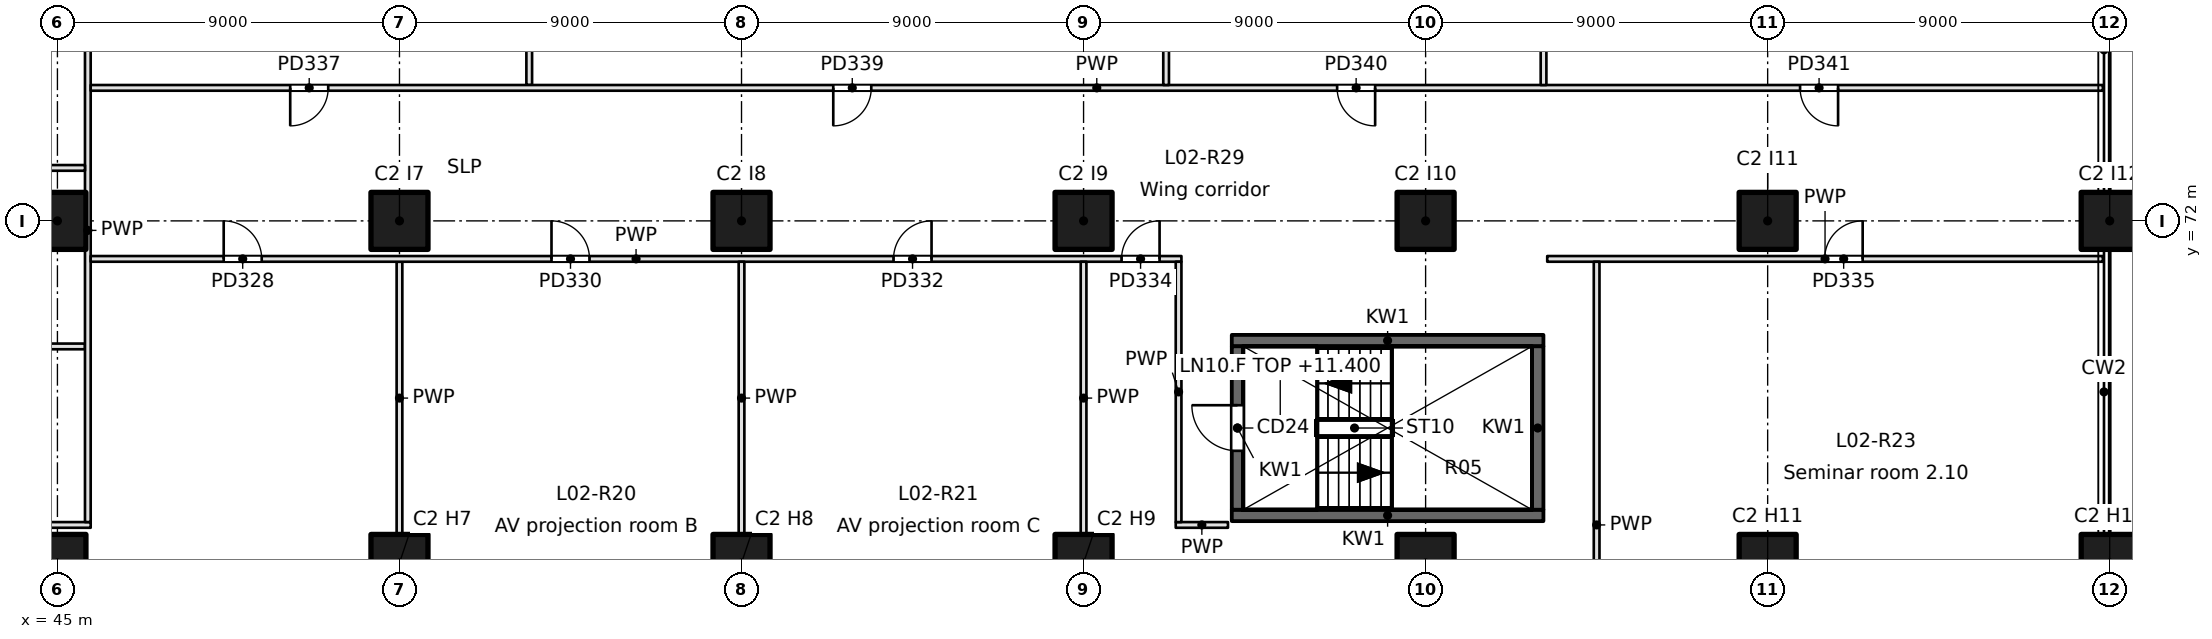
"""IFC4 building model, lengths in metres.
Left out: names, types, materials, properties, quantities, classifications, styles, units other than length and angle.
Written with IfcOpenShell. Run it as: python <this file> out.ifc"""

import sys

from ifc_helpers import new_model, si_unit, direction, frame, frame_2d, origin, origin_2d, place, context, subcontext, project, spatial, rectangle, extrude, element, fill, save


model = new_model("IFC4")
c1 = context("Model", 3, precision=1e-05, world=origin(), true_north=direction((0.0, 1.0)))
c2 = subcontext(c1, "Body", "Model", "MODEL_VIEW")
j1 = project(units=[si_unit("LENGTHUNIT", "METRE"), si_unit("PLANEANGLEUNIT", "RADIAN")], contexts=[c1])
p1 = place(None, origin())
s1 = spatial("IfcSite", under=j1, at=p1, CompositionType="ELEMENT")
p2 = place(p1, origin())
s2 = spatial("IfcBuilding", under=s1, at=p2, CompositionType="ELEMENT")
p3 = place(p2, frame((0.0, 0.0, 11.4)))
s3 = spatial("IfcBuildingStorey", under=s2, at=p3, CompositionType="ELEMENT", Elevation=11.4)
for number, where, z_axis, x_axis in (
    (1, (99.0, 63.0, 0.0), (0.0, 0.0, 1.0), (1.0, 0.0, 0.0)),
    (2, (99.0, 72.0, 0.0), (0.0, 0.0, 1.0), (1.0, 0.0, 0.0)),
    (3, (45.0, 63.0, 0.0), (0.0, 0.0, 1.0), (1.0, 0.0, 0.0)),
    (4, (45.0, 72.0, 0.0), (0.0, 0.0, 1.0), (1.0, 0.0, 0.0)),
    (5, (54.0, 63.0, 0.0), (0.0, 0.0, 1.0), (1.0, 0.0, 0.0)),
    (6, (54.0, 72.0, 0.0), (0.0, 0.0, 1.0), (1.0, 0.0, 0.0)),
    (7, (63.0, 63.0, 0.0), (0.0, 0.0, 1.0), (1.0, 0.0, 0.0)),
    (8, (63.0, 72.0, 0.0), (0.0, 0.0, 1.0), (1.0, 0.0, 0.0)),
    (9, (72.0, 63.0, 0.0), (0.0, 0.0, 1.0), (1.0, 0.0, 0.0)),
    (10, (72.0, 72.0, 0.0), (0.0, 0.0, 1.0), (1.0, 0.0, 0.0)),
    (11, (81.0, 63.0, 0.0), (0.0, 0.0, 1.0), (1.0, 0.0, 0.0)),
    (12, (81.0, 72.0, 0.0), (0.0, 0.0, 1.0), (1.0, 0.0, 0.0)),
    (13, (90.0, 63.0, 0.0), (0.0, 0.0, 1.0), (1.0, 0.0, 0.0)),
    (14, (90.0, 72.0, 0.0), (0.0, 0.0, 1.0), (1.0, 0.0, 0.0)),
):
    element("IfcColumn", number, at=place(p3, frame(where, z_axis=z_axis, x_axis=x_axis)), inside=s3, PredefinedType="COLUMN", context=c2, shape_type="SweptSolid", body=[
        extrude(rectangle(XDim=1.5, YDim=1.5, at=origin_2d()), origin(), (0.0, 0.0, 1.0), 5.4),
    ])
for number, where, z_axis, x_axis in (
    (15, (75.9, 64.25, -0.35), (0.0, 0.0, 1.0), (1.0, 0.0, 0.0)),
    (16, (75.9, 68.85, -0.35), (0.0, 0.0, 1.0), (1.0, 0.0, 0.0)),
):
    element("IfcWall", number, at=place(p3, frame(where, z_axis=z_axis, x_axis=x_axis)), inside=s3, PredefinedType="SOLIDWALL", context=c2, shape_type="SweptSolid", body=[
        extrude(rectangle(XDim=8.2, YDim=0.3, at=frame_2d((4.1, 0.0))), origin(), (0.0, 0.0, 1.0), 5.4),
    ])
p4 = place(p3, frame((76.05, 64.4, -0.35), z_axis=(0.0, 0.0, 1.0), x_axis=(0.0, 1.0, 0.0)))
e17 = element("IfcWall", 17, at=p4, inside=s3, PredefinedType="SOLIDWALL", context=c2, shape_type="SweptSolid", body=[
    extrude(rectangle(XDim=4.3, YDim=0.3, at=frame_2d((2.15, 0.0))), origin(), (0.0, 0.0, 1.0), 5.4),
])
p5 = place(p4, frame((1.55, 0.0, 0.35)))
e18 = element("IfcOpeningElement", 18, at=p5, cuts=e17, PredefinedType="OPENING", context=c2, shape_type="SweptSolid", body=[
    extrude(rectangle(XDim=1.2, YDim=2.1, at=frame_2d((0.6, 1.05))), frame((0.0, 0.15, 0.0), z_axis=(0.0, -1.0, 0.0), x_axis=(1.0, 0.0, 0.0)), (0.0, 0.0, 1.0), 0.3),
])
p6 = place(p3, frame((83.95, 64.4, -0.35), z_axis=(0.0, 0.0, 1.0), x_axis=(0.0, 1.0, 0.0)))
e19 = element("IfcWall", 19, at=p6, inside=s3, PredefinedType="SOLIDWALL", context=c2, shape_type="SweptSolid", body=[
    extrude(rectangle(XDim=4.3, YDim=0.3, at=frame_2d((2.15, 0.0))), origin(), (0.0, 0.0, 1.0), 5.4),
])
p7 = place(p3, frame((40.575, 68.697, 0.0), z_axis=(0.0, 0.0, 1.0), x_axis=(1.0, 0.0, 0.0)))
e20 = element("IfcWall", 20, at=p7, inside=s3, PredefinedType="PARTITIONING", context=c2, shape_type="SweptSolid", body=[
    extrude(rectangle(XDim=5.15, YDim=0.15, at=frame_2d((2.575, 0.0))), origin(), (0.0, 0.0, 1.0), 5.05),
])
p8 = place(p3, frame((45.875, 64.0, 0.0), z_axis=(0.0, 0.0, 1.0), x_axis=(-1.0, 0.0, 0.0)))
e21 = element("IfcWall", 21, at=p8, inside=s3, PredefinedType="PARTITIONING", context=c2, shape_type="SweptSolid", body=[
    extrude(rectangle(XDim=5.45, YDim=0.15, at=frame_2d((2.725, 0.0))), origin(), (0.0, 0.0, 1.0), 5.05),
])
p9 = place(p3, frame((74.425, 64.0, 0.0), z_axis=(0.0, 0.0, 1.0), x_axis=(1.0, 0.0, 0.0)))
e22 = element("IfcWall", 22, at=p9, inside=s3, PredefinedType="PARTITIONING", context=c2, shape_type="SweptSolid", body=[
    extrude(rectangle(XDim=1.375, YDim=0.15, at=frame_2d((0.688, 0.0))), origin(), (0.0, 0.0, 1.0), 5.05),
])
p10 = place(p3, frame((45.8, 79.425, 0.0), z_axis=(0.0, 0.0, 1.0), x_axis=(0.0, -1.0, 0.0)))
e23 = element("IfcWall", 23, at=p10, inside=s3, PredefinedType="PARTITIONING", context=c2, shape_type="SweptSolid", body=[
    extrude(rectangle(XDim=15.35, YDim=0.15, at=frame_2d((7.675, 0.0))), origin(), (0.0, 0.0, 1.0), 5.05),
])
p11 = place(p3, frame((40.575, 73.394, 0.0), z_axis=(0.0, 0.0, 1.0), x_axis=(1.0, 0.0, 0.0)))
e24 = element("IfcWall", 24, at=p11, inside=s3, PredefinedType="PARTITIONING", context=c2, shape_type="SweptSolid", body=[
    extrude(rectangle(XDim=5.15, YDim=0.15, at=frame_2d((2.575, 0.0))), origin(), (0.0, 0.0, 1.0), 5.05),
])
p12 = place(p3, frame((54.0, 63.75, 0.0), z_axis=(0.0, 0.0, 1.0), x_axis=(0.0, 1.0, 0.0)))
e25 = element("IfcWall", 25, at=p12, inside=s3, PredefinedType="PARTITIONING", context=c2, shape_type="SweptSolid", body=[
    extrude(rectangle(XDim=7.175, YDim=0.15, at=frame_2d((3.587, 0.0))), origin(), (0.0, 0.0, 1.0), 5.05),
])
p13 = place(p3, frame((45.875, 71.0, 0.0), z_axis=(0.0, 0.0, 1.0), x_axis=(1.0, 0.0, 0.0)))
e26 = element("IfcWall", 26, at=p13, inside=s3, PredefinedType="PARTITIONING", context=c2, shape_type="SweptSolid", body=[
    extrude(rectangle(XDim=28.7, YDim=0.15, at=frame_2d((14.35, 0.0))), origin(), (0.0, 0.0, 1.0), 5.05),
])
p14 = place(p13, frame((3.5, 0.0, 0.0)))
e27 = element("IfcOpeningElement", 27, at=p14, cuts=e26, PredefinedType="OPENING", context=c2, shape_type="SweptSolid", body=[
    extrude(rectangle(XDim=1.0, YDim=2.1, at=frame_2d((0.5, 1.05))), frame((0.0, 0.075, 0.0), z_axis=(0.0, -1.0, 0.0), x_axis=(1.0, 0.0, 0.0)), (0.0, 0.0, 1.0), 0.15),
])
p15 = place(p13, frame((12.125, 0.0, 0.0)))
e28 = element("IfcOpeningElement", 28, at=p15, cuts=e26, PredefinedType="OPENING", context=c2, shape_type="SweptSolid", body=[
    extrude(rectangle(XDim=1.0, YDim=2.1, at=frame_2d((0.5, 1.05))), frame((0.0, 0.075, 0.0), z_axis=(0.0, -1.0, 0.0), x_axis=(1.0, 0.0, 0.0)), (0.0, 0.0, 1.0), 0.15),
])
p16 = place(p13, frame((21.125, 0.0, 0.0)))
e29 = element("IfcOpeningElement", 29, at=p16, cuts=e26, PredefinedType="OPENING", context=c2, shape_type="SweptSolid", body=[
    extrude(rectangle(XDim=1.0, YDim=2.1, at=frame_2d((0.5, 1.05))), frame((0.0, 0.075, 0.0), z_axis=(0.0, -1.0, 0.0), x_axis=(1.0, 0.0, 0.0)), (0.0, 0.0, 1.0), 0.15),
])
p17 = place(p13, frame((27.125, 0.0, 0.0)))
e30 = element("IfcOpeningElement", 30, at=p17, cuts=e26, PredefinedType="OPENING", context=c2, shape_type="SweptSolid", body=[
    extrude(rectangle(XDim=1.0, YDim=2.1, at=frame_2d((0.5, 1.05))), frame((0.0, 0.075, 0.0), z_axis=(0.0, -1.0, 0.0), x_axis=(1.0, 0.0, 0.0)), (0.0, 0.0, 1.0), 0.15),
])
p18 = place(p3, frame((84.2, 71.0, 0.0), z_axis=(0.0, 0.0, 1.0), x_axis=(1.0, 0.0, 0.0)))
e31 = element("IfcWall", 31, at=p18, inside=s3, PredefinedType="PARTITIONING", context=c2, shape_type="SweptSolid", body=[
    extrude(rectangle(XDim=14.62, YDim=0.15, at=frame_2d((7.31, 0.0))), origin(), (0.0, 0.0, 1.0), 5.05),
])
p19 = place(p18, frame((7.3, 0.0, 0.0)))
e32 = element("IfcOpeningElement", 32, at=p19, cuts=e31, PredefinedType="OPENING", context=c2, shape_type="SweptSolid", body=[
    extrude(rectangle(XDim=1.0, YDim=2.1, at=frame_2d((0.5, 1.05))), frame((0.0, 0.075, 0.0), z_axis=(0.0, -1.0, 0.0), x_axis=(1.0, 0.0, 0.0)), (0.0, 0.0, 1.0), 0.15),
])
for number, where, z_axis, x_axis in (
    (33, (63.0, 63.75, 0.0), (0.0, 0.0, 1.0), (0.0, 1.0, 0.0)),
    (34, (72.0, 63.75, 0.0), (0.0, 0.0, 1.0), (0.0, 1.0, 0.0)),
):
    element("IfcWall", number, at=place(p3, frame(where, z_axis=z_axis, x_axis=x_axis)), inside=s3, PredefinedType="PARTITIONING", context=c2, shape_type="SweptSolid", body=[
        extrude(rectangle(XDim=7.175, YDim=0.15, at=frame_2d((3.587, 0.0))), origin(), (0.0, 0.0, 1.0), 5.05),
    ])
p20 = place(p3, frame((85.5, 57.075, 0.0), z_axis=(0.0, 0.0, 1.0), x_axis=(0.0, 1.0, 0.0)))
e35 = element("IfcWall", 35, at=p20, inside=s3, PredefinedType="PARTITIONING", context=c2, shape_type="SweptSolid", body=[
    extrude(rectangle(XDim=13.85, YDim=0.15, at=frame_2d((6.925, 0.0))), origin(), (0.0, 0.0, 1.0), 5.05),
])
p21 = place(p3, frame((74.5, 70.925, 0.0), z_axis=(0.0, 0.0, 1.0), x_axis=(0.0, -1.0, 0.0)))
e36 = element("IfcWall", 36, at=p21, inside=s3, PredefinedType="PARTITIONING", context=c2, shape_type="SweptSolid", body=[
    extrude(rectangle(XDim=6.85, YDim=0.15, at=frame_2d((3.425, 0.0))), origin(), (0.0, 0.0, 1.0), 5.05),
])
p22 = place(p3, frame((57.414, 75.575, 0.0), z_axis=(0.0, 0.0, 1.0), x_axis=(0.0, 1.0, 0.0)))
e37 = element("IfcWall", 37, at=p22, inside=s3, PredefinedType="PARTITIONING", context=c2, shape_type="SweptSolid", body=[
    extrude(rectangle(XDim=17.925, YDim=0.15, at=frame_2d((8.962, 0.0))), origin(), (0.0, 0.0, 1.0), 5.05),
])
p23 = place(p3, frame((98.82, 75.5, 0.0), z_axis=(0.0, 0.0, 1.0), x_axis=(-1.0, 0.0, 0.0)))
e38 = element("IfcWall", 38, at=p23, inside=s3, PredefinedType="PARTITIONING", context=c2, shape_type="SweptSolid", body=[
    extrude(rectangle(XDim=52.945, YDim=0.15, at=frame_2d((26.473, 0.0))), origin(), (0.0, 0.0, 1.0), 5.05),
])
p24 = place(p23, frame((46.695, 0.0, 0.0)))
e39 = element("IfcOpeningElement", 39, at=p24, cuts=e38, PredefinedType="OPENING", context=c2, shape_type="SweptSolid", body=[
    extrude(rectangle(XDim=1.0, YDim=2.1, at=frame_2d((0.5, 1.05))), frame((0.0, 0.075, 0.0), z_axis=(0.0, -1.0, 0.0), x_axis=(1.0, 0.0, 0.0)), (0.0, 0.0, 1.0), 0.15),
])
p25 = place(p23, frame((32.406, 0.0, 0.0)))
e40 = element("IfcOpeningElement", 40, at=p25, cuts=e38, PredefinedType="OPENING", context=c2, shape_type="SweptSolid", body=[
    extrude(rectangle(XDim=1.0, YDim=2.1, at=frame_2d((0.5, 1.05))), frame((0.0, 0.075, 0.0), z_axis=(0.0, -1.0, 0.0), x_axis=(1.0, 0.0, 0.0)), (0.0, 0.0, 1.0), 0.15),
])
p26 = place(p23, frame((19.148, 0.0, 0.0)))
e41 = element("IfcOpeningElement", 41, at=p26, cuts=e38, PredefinedType="OPENING", context=c2, shape_type="SweptSolid", body=[
    extrude(rectangle(XDim=1.0, YDim=2.1, at=frame_2d((0.5, 1.05))), frame((0.0, 0.075, 0.0), z_axis=(0.0, -1.0, 0.0), x_axis=(1.0, 0.0, 0.0)), (0.0, 0.0, 1.0), 0.15),
])
p27 = place(p23, frame((6.967, 0.0, 0.0)))
e42 = element("IfcOpeningElement", 42, at=p27, cuts=e38, PredefinedType="OPENING", context=c2, shape_type="SweptSolid", body=[
    extrude(rectangle(XDim=1.0, YDim=2.1, at=frame_2d((0.5, 1.05))), frame((0.0, 0.075, 0.0), z_axis=(0.0, -1.0, 0.0), x_axis=(1.0, 0.0, 0.0)), (0.0, 0.0, 1.0), 0.15),
])
p28 = place(p3, frame((74.172, 75.575, 0.0), z_axis=(0.0, 0.0, 1.0), x_axis=(0.0, 1.0, 0.0)))
e43 = element("IfcWall", 43, at=p28, inside=s3, PredefinedType="PARTITIONING", context=c2, shape_type="SweptSolid", body=[
    extrude(rectangle(XDim=17.925, YDim=0.15, at=frame_2d((8.962, 0.0))), origin(), (0.0, 0.0, 1.0), 5.05),
])
p29 = place(p3, frame((84.103, 75.575, 0.0), z_axis=(0.0, 0.0, 1.0), x_axis=(0.0, 1.0, 0.0)))
e44 = element("IfcWall", 44, at=p29, inside=s3, PredefinedType="PARTITIONING", context=c2, shape_type="SweptSolid", body=[
    extrude(rectangle(XDim=22.525, YDim=0.15, at=frame_2d((11.263, 0.0))), origin(), (0.0, 0.0, 1.0), 5.05),
])
p30 = place(p5, origin())
e45 = element("IfcDoor", 45, at=p30, inside=s3, OperationType="SINGLE_SWING_RIGHT", PredefinedType="DOOR", context=c2, shape_type="SweptSolid", body=[
    extrude(rectangle(XDim=1.2, YDim=2.1, at=frame_2d((0.6, 1.05))), frame((0.0, 0.025, 0.0), z_axis=(0.0, -1.0, 0.0), x_axis=(1.0, 0.0, 0.0)), (0.0, 0.0, 1.0), 0.05),
])
fill(e18, e45)
p31 = place(p14, origin())
e46 = element("IfcDoor", 46, at=p31, inside=s3, OperationType="SINGLE_SWING_LEFT", PredefinedType="DOOR", context=c2, shape_type="SweptSolid", body=[
    extrude(rectangle(XDim=1.0, YDim=2.1, at=frame_2d((0.5, 1.05))), frame((0.0, 0.025, 0.0), z_axis=(0.0, -1.0, 0.0), x_axis=(1.0, 0.0, 0.0)), (0.0, 0.0, 1.0), 0.05),
])
fill(e27, e46)
p32 = place(p15, origin())
e47 = element("IfcDoor", 47, at=p32, inside=s3, OperationType="SINGLE_SWING_LEFT", PredefinedType="DOOR", context=c2, shape_type="SweptSolid", body=[
    extrude(rectangle(XDim=1.0, YDim=2.1, at=frame_2d((0.5, 1.05))), frame((0.0, 0.025, 0.0), z_axis=(0.0, -1.0, 0.0), x_axis=(1.0, 0.0, 0.0)), (0.0, 0.0, 1.0), 0.05),
])
fill(e28, e47)
p33 = place(p16, origin())
e48 = element("IfcDoor", 48, at=p33, inside=s3, OperationType="SINGLE_SWING_RIGHT", PredefinedType="DOOR", context=c2, shape_type="SweptSolid", body=[
    extrude(rectangle(XDim=1.0, YDim=2.1, at=frame_2d((0.5, 1.05))), frame((0.0, 0.025, 0.0), z_axis=(0.0, -1.0, 0.0), x_axis=(1.0, 0.0, 0.0)), (0.0, 0.0, 1.0), 0.05),
])
fill(e29, e48)
p34 = place(p17, origin())
e49 = element("IfcDoor", 49, at=p34, inside=s3, OperationType="SINGLE_SWING_RIGHT", PredefinedType="DOOR", context=c2, shape_type="SweptSolid", body=[
    extrude(rectangle(XDim=1.0, YDim=2.1, at=frame_2d((0.5, 1.05))), frame((0.0, 0.025, 0.0), z_axis=(0.0, -1.0, 0.0), x_axis=(1.0, 0.0, 0.0)), (0.0, 0.0, 1.0), 0.05),
])
fill(e30, e49)
p35 = place(p19, origin())
e50 = element("IfcDoor", 50, at=p35, inside=s3, OperationType="SINGLE_SWING_RIGHT", PredefinedType="DOOR", context=c2, shape_type="SweptSolid", body=[
    extrude(rectangle(XDim=1.0, YDim=2.1, at=frame_2d((0.5, 1.05))), frame((0.0, 0.025, 0.0), z_axis=(0.0, -1.0, 0.0), x_axis=(1.0, 0.0, 0.0)), (0.0, 0.0, 1.0), 0.05),
])
fill(e32, e50)
p36 = place(p24, origin())
e51 = element("IfcDoor", 51, at=p36, inside=s3, OperationType="SINGLE_SWING_RIGHT", PredefinedType="DOOR", context=c2, shape_type="SweptSolid", body=[
    extrude(rectangle(XDim=1.0, YDim=2.1, at=frame_2d((0.5, 1.05))), frame((0.0, 0.025, 0.0), z_axis=(0.0, -1.0, 0.0), x_axis=(1.0, 0.0, 0.0)), (0.0, 0.0, 1.0), 0.05),
])
fill(e39, e51)
p37 = place(p25, origin())
e52 = element("IfcDoor", 52, at=p37, inside=s3, OperationType="SINGLE_SWING_RIGHT", PredefinedType="DOOR", context=c2, shape_type="SweptSolid", body=[
    extrude(rectangle(XDim=1.0, YDim=2.1, at=frame_2d((0.5, 1.05))), frame((0.0, 0.025, 0.0), z_axis=(0.0, -1.0, 0.0), x_axis=(1.0, 0.0, 0.0)), (0.0, 0.0, 1.0), 0.05),
])
fill(e40, e52)
p38 = place(p26, origin())
e53 = element("IfcDoor", 53, at=p38, inside=s3, OperationType="SINGLE_SWING_LEFT", PredefinedType="DOOR", context=c2, shape_type="SweptSolid", body=[
    extrude(rectangle(XDim=1.0, YDim=2.1, at=frame_2d((0.5, 1.05))), frame((0.0, 0.025, 0.0), z_axis=(0.0, -1.0, 0.0), x_axis=(1.0, 0.0, 0.0)), (0.0, 0.0, 1.0), 0.05),
])
fill(e41, e53)
p39 = place(p27, origin())
e54 = element("IfcDoor", 54, at=p39, inside=s3, OperationType="SINGLE_SWING_LEFT", PredefinedType="DOOR", context=c2, shape_type="SweptSolid", body=[
    extrude(rectangle(XDim=1.0, YDim=2.1, at=frame_2d((0.5, 1.05))), frame((0.0, 0.025, 0.0), z_axis=(0.0, -1.0, 0.0), x_axis=(1.0, 0.0, 0.0)), (0.0, 0.0, 1.0), 0.05),
])
fill(e42, e54)
save(model, sys.argv[1])
